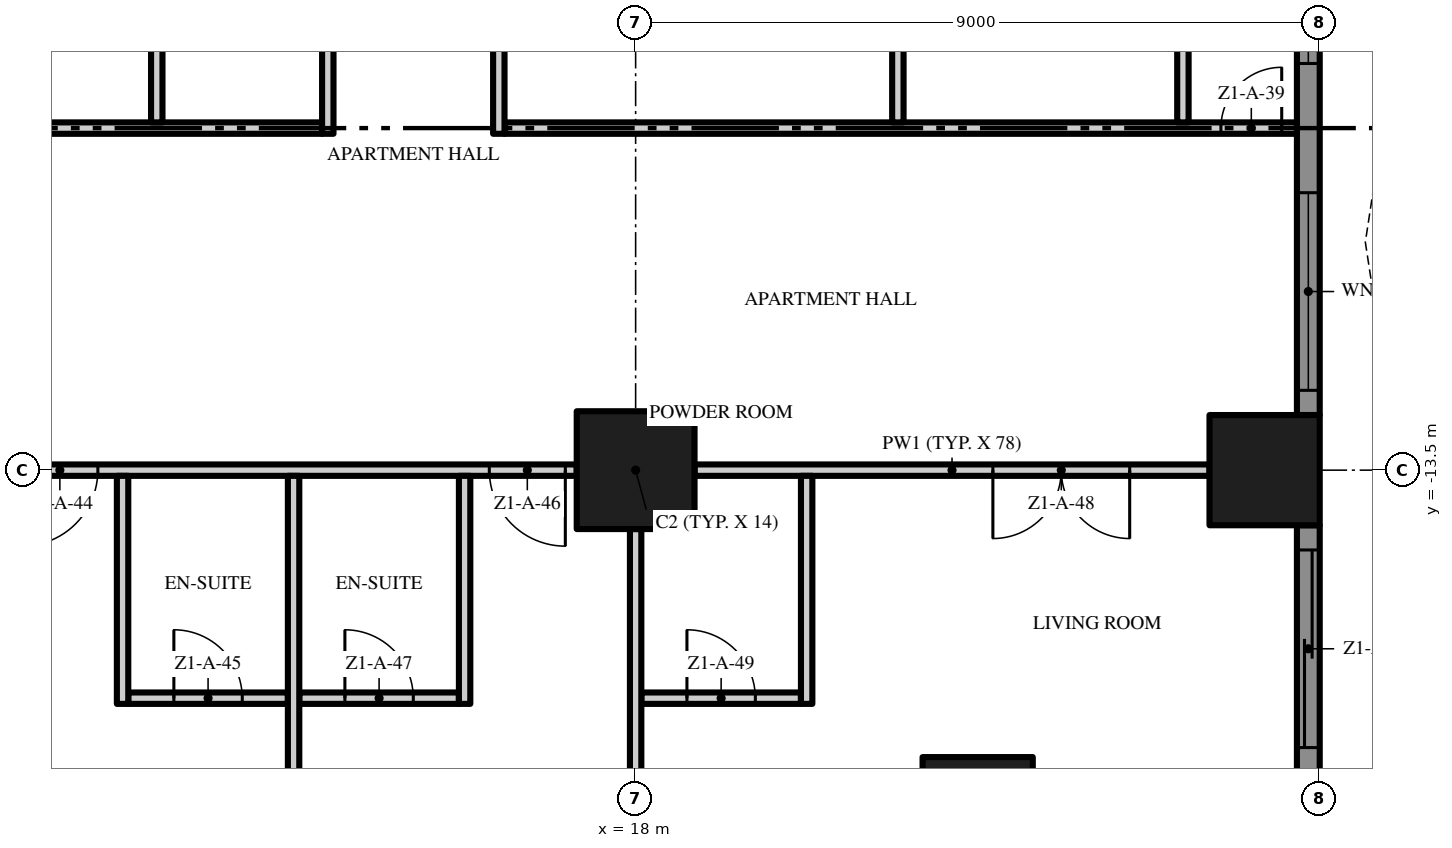
"""IFC4 building model, lengths in metres.
Left out: names, types, materials, properties, quantities, classifications, styles, units other than length and angle.
Written with IfcOpenShell. Run it as: python <this file> out.ifc"""

import sys

from ifc_helpers import new_model, si_unit, direction, frame, frame_2d, origin, origin_2d, place, context, subcontext, project, spatial, polyline, rectangle, outline, extrude, element, fill, save


model = new_model("IFC4")
c1 = context("Model", 3, precision=1e-05, world=origin(), true_north=direction((0.0, 1.0)))
c2 = subcontext(c1, "Body", "Model", "MODEL_VIEW")
j1 = project(units=[si_unit("LENGTHUNIT", "METRE"), si_unit("PLANEANGLEUNIT", "RADIAN")], contexts=[c1])
p1 = place(None, origin())
s1 = spatial("IfcSite", under=j1, at=p1, CompositionType="ELEMENT")
p2 = place(p1, origin())
s2 = spatial("IfcBuilding", under=s1, at=p2, CompositionType="ELEMENT")
p3 = place(p2, frame((0.0, 0.0, 22.6)))
s3 = spatial("IfcBuildingStorey", under=s2, at=p3, CompositionType="ELEMENT", Elevation=22.6)
p4 = place(p3, frame((18.0, -13.5, 0.0), z_axis=(0.0, 0.0, 1.0), x_axis=(1.0, 0.0, 0.0)))
e1 = element("IfcColumn", 1, at=p4, inside=s3, PredefinedType="COLUMN", context=c2, shape_type="SweptSolid", body=[
    extrude(rectangle(XDim=1.55, YDim=1.55, at=origin_2d()), origin(), (0.0, 0.0, 1.0), 3.5),
])
for number, where, z_axis, x_axis in (
    (2, (26.275, -13.5, 0.0), (0.0, 0.0, 1.0), (1.0, 0.0, 0.0)),
    (3, (22.5, -18.0, 0.0), (0.0, 0.0, 1.0), (1.0, 0.0, 0.0)),
):
    element("IfcColumn", number, at=place(p3, frame(where, z_axis=z_axis, x_axis=x_axis)), inside=s3, PredefinedType="COLUMN", context=c2, shape_type="SweptSolid", body=[
        extrude(rectangle(XDim=1.45, YDim=1.45, at=origin_2d()), origin(), (0.0, 0.0, 1.0), 3.5),
    ])
p5 = place(p3, frame((26.85, -14.225, 0.0), z_axis=(0.0, 0.0, 1.0), x_axis=(0.0, -1.0, 0.0)))
e4 = element("IfcWall", 4, at=p5, inside=s3, PredefinedType="SOLIDWALL", context=c2, shape_type="SweptSolid", body=[
    extrude(rectangle(XDim=3.475, YDim=0.3, at=frame_2d((1.738, 0.0))), origin(), (0.0, 0.0, 1.0), 3.5),
])
p6 = place(p5, frame((0.325, 0.0, 0.0)))
e5 = element("IfcOpeningElement", 5, at=p6, cuts=e4, PredefinedType="OPENING", context=c2, shape_type="SweptSolid", body=[
    extrude(rectangle(XDim=2.6, YDim=2.4, at=frame_2d((1.3, 1.2))), frame((0.0, 0.16, 0.0), z_axis=(0.0, -1.0, 0.0), x_axis=(1.0, 0.0, 0.0)), (0.0, 0.0, 1.0), 0.32),
])
p7 = place(p3, frame((26.85, -5.225, 0.0), z_axis=(0.0, 0.0, 1.0), x_axis=(0.0, -1.0, 0.0)))
e6 = element("IfcWall", 6, at=p7, inside=s3, PredefinedType="SOLIDWALL", context=c2, shape_type="SweptSolid", body=[
    extrude(rectangle(XDim=7.55, YDim=0.3, at=frame_2d((3.775, 0.0))), origin(), (0.0, 0.0, 1.0), 3.5),
])
p8 = place(p7, frame((4.625, 0.0, 0.45)))
e7 = element("IfcOpeningElement", 7, at=p8, cuts=e6, PredefinedType="OPENING", context=c2, shape_type="SweptSolid", body=[
    extrude(rectangle(XDim=2.6, YDim=2.65, at=frame_2d((1.3, 1.325))), frame((0.0, 0.16, 0.0), z_axis=(0.0, -1.0, 0.0), x_axis=(1.0, 0.0, 0.0)), (0.0, 0.0, 1.0), 0.32),
])
p9 = place(p7, frame((0.325, 0.0, 0.45)))
e8 = element("IfcOpeningElement", 8, at=p9, cuts=e6, PredefinedType="OPENING", context=c2, shape_type="SweptSolid", body=[
    extrude(rectangle(XDim=2.6, YDim=2.65, at=frame_2d((1.3, 1.325))), frame((0.0, 0.16, 0.0), z_axis=(0.0, -1.0, 0.0), x_axis=(1.0, 0.0, 0.0)), (0.0, 0.0, 1.0), 0.32),
])
p10 = place(p3, origin())
e9 = element("IfcWall", 9, at=p10, inside=s3, PredefinedType="USERDEFINED", context=c2, shape_type="SweptSolid", body=[
    extrude(outline(polyline([(30.0, -18.0), (29.771, -16.5), (29.171, -15.0), (28.429, -13.5), (27.829, -12.0), (27.6, -10.5), (27.829, -9.0), (28.429, -7.5), (29.171, -6.0), (29.771, -4.5), (30.0, -3.0), (29.771, -1.5), (29.171, 0.0), (28.429, 1.5), (27.829, 3.0), (27.6, 4.5), (27.829, 6.0), (28.429, 7.5), (29.171, 9.0), (29.771, 10.5), (30.0, 12.0), (29.771, 13.5), (29.171, 15.0), (28.429, 16.5), (27.829, 18.0), (27.597, 17.907), (28.201, 16.398), (28.942, 14.898), (29.528, 13.434), (29.747, 12.0), (29.528, 10.566), (28.942, 9.102), (28.201, 7.602), (27.586, 6.066), (27.347, 4.5), (27.586, 2.934), (28.201, 1.398), (28.942, -0.102), (29.528, -1.566), (29.747, -3.0), (29.528, -4.434), (28.942, -5.898), (28.201, -7.398), (27.586, -8.934), (27.347, -10.5), (27.586, -12.066), (28.201, -13.602), (28.942, -15.102), (29.528, -16.566), (29.753, -18.038), (30.0, -18.0)])), origin(), (0.0, 0.0, 1.0), 0.9),
])
p11 = place(p3, frame((11.325, -16.5, 0.0), z_axis=(0.0, 0.0, 1.0), x_axis=(1.0, 0.0, 0.0)))
e10 = element("IfcWall", 10, at=p11, inside=s3, PredefinedType="PARTITIONING", context=c2, shape_type="SweptSolid", body=[
    extrude(rectangle(XDim=2.1, YDim=0.15, at=frame_2d((1.05, 0.0))), origin(), (0.0, 0.0, 1.0), 3.5),
])
p12 = place(p11, frame((0.6, 0.0, 0.0)))
e11 = element("IfcOpeningElement", 11, at=p12, cuts=e10, PredefinedType="OPENING", context=c2, shape_type="SweptSolid", body=[
    extrude(rectangle(XDim=0.9, YDim=2.1, at=frame_2d((0.45, 1.05))), frame((0.0, 0.085, 0.0), z_axis=(0.0, -1.0, 0.0), x_axis=(1.0, 0.0, 0.0)), (0.0, 0.0, 1.0), 0.17),
])
p13 = place(p3, frame((13.575, -16.5, 0.0), z_axis=(0.0, 0.0, 1.0), x_axis=(1.0, 0.0, 0.0)))
e12 = element("IfcWall", 12, at=p13, inside=s3, PredefinedType="PARTITIONING", context=c2, shape_type="SweptSolid", body=[
    extrude(rectangle(XDim=2.1, YDim=0.15, at=frame_2d((1.05, 0.0))), origin(), (0.0, 0.0, 1.0), 3.5),
])
p14 = place(p13, frame((0.6, 0.0, 0.0)))
e13 = element("IfcOpeningElement", 13, at=p14, cuts=e12, PredefinedType="OPENING", context=c2, shape_type="SweptSolid", body=[
    extrude(rectangle(XDim=0.9, YDim=2.1, at=frame_2d((0.45, 1.05))), frame((0.0, 0.085, 0.0), z_axis=(0.0, -1.0, 0.0), x_axis=(1.0, 0.0, 0.0)), (0.0, 0.0, 1.0), 0.17),
])
p15 = place(p3, frame((18.075, -16.5, 0.0), z_axis=(0.0, 0.0, 1.0), x_axis=(1.0, 0.0, 0.0)))
e14 = element("IfcWall", 14, at=p15, inside=s3, PredefinedType="PARTITIONING", context=c2, shape_type="SweptSolid", body=[
    extrude(rectangle(XDim=2.1, YDim=0.15, at=frame_2d((1.05, 0.0))), origin(), (0.0, 0.0, 1.0), 3.5),
])
p16 = place(p15, frame((0.6, 0.0, 0.0)))
e15 = element("IfcOpeningElement", 15, at=p16, cuts=e14, PredefinedType="OPENING", context=c2, shape_type="SweptSolid", body=[
    extrude(rectangle(XDim=0.9, YDim=2.1, at=frame_2d((0.45, 1.05))), frame((0.0, 0.085, 0.0), z_axis=(0.0, -1.0, 0.0), x_axis=(1.0, 0.0, 0.0)), (0.0, 0.0, 1.0), 0.17),
])
p17 = place(p3, frame((17.225, -13.5, 0.0), z_axis=(0.0, 0.0, 1.0), x_axis=(-1.0, 0.0, 0.0)))
e16 = element("IfcWall", 16, at=p17, inside=s3, PredefinedType="PARTITIONING", context=c2, shape_type="SweptSolid", body=[
    extrude(rectangle(XDim=7.45, YDim=0.15, at=frame_2d((3.725, 0.0))), origin(), (0.0, 0.0, 1.0), 3.5),
])
p18 = place(p17, frame((6.3, 0.0, 0.0)))
e17 = element("IfcOpeningElement", 17, at=p18, cuts=e16, PredefinedType="OPENING", context=c2, shape_type="SweptSolid", body=[
    extrude(rectangle(XDim=1.0, YDim=2.4, at=frame_2d((0.5, 1.2))), frame((0.0, 0.085, 0.0), z_axis=(0.0, -1.0, 0.0), x_axis=(1.0, 0.0, 0.0)), (0.0, 0.0, 1.0), 0.17),
])
p19 = place(p17, frame((0.15, 0.0, 0.0)))
e18 = element("IfcOpeningElement", 18, at=p19, cuts=e16, PredefinedType="OPENING", context=c2, shape_type="SweptSolid", body=[
    extrude(rectangle(XDim=1.0, YDim=2.4, at=frame_2d((0.5, 1.2))), frame((0.0, 0.085, 0.0), z_axis=(0.0, -1.0, 0.0), x_axis=(1.0, 0.0, 0.0)), (0.0, 0.0, 1.0), 0.17),
])
p20 = place(p3, frame((25.55, -13.5, 0.0), z_axis=(0.0, 0.0, 1.0), x_axis=(-1.0, 0.0, 0.0)))
e19 = element("IfcWall", 19, at=p20, inside=s3, PredefinedType="PARTITIONING", context=c2, shape_type="SweptSolid", body=[
    extrude(rectangle(XDim=6.775, YDim=0.15, at=frame_2d((3.388, 0.0))), origin(), (0.0, 0.0, 1.0), 3.5),
])
p21 = place(p20, frame((1.05, 0.0, 0.0)))
e20 = element("IfcOpeningElement", 20, at=p21, cuts=e19, PredefinedType="OPENING", context=c2, shape_type="SweptSolid", body=[
    extrude(rectangle(XDim=1.8, YDim=2.4, at=frame_2d((0.9, 1.2))), frame((0.0, 0.085, 0.0), z_axis=(0.0, -1.0, 0.0), x_axis=(1.0, 0.0, 0.0)), (0.0, 0.0, 1.0), 0.17),
])
p22 = place(p3, frame((0.1, -9.0, 0.0), z_axis=(0.0, 0.0, 1.0), x_axis=(1.0, 0.0, 0.0)))
e21 = element("IfcWall", 21, at=p22, inside=s3, PredefinedType="PARTITIONING", context=c2, shape_type="SweptSolid", body=[
    extrude(rectangle(XDim=13.775, YDim=0.15, at=frame_2d((6.888, 0.0))), origin(), (0.0, 0.0, 1.0), 3.5),
])
p23 = place(p22, frame((8.1, 0.0, 0.0)))
e22 = element("IfcOpeningElement", 22, at=p23, cuts=e21, PredefinedType="OPENING", context=c2, shape_type="SweptSolid", body=[
    extrude(rectangle(XDim=1.0, YDim=2.4, at=frame_2d((0.5, 1.2))), frame((0.0, 0.085, 0.0), z_axis=(0.0, -1.0, 0.0), x_axis=(1.0, 0.0, 0.0)), (0.0, 0.0, 1.0), 0.17),
])
p24 = place(p3, frame((16.275, -9.0, 0.0), z_axis=(0.0, 0.0, 1.0), x_axis=(1.0, 0.0, 0.0)))
e23 = element("IfcWall", 23, at=p24, inside=s3, PredefinedType="PARTITIONING", context=c2, shape_type="SweptSolid", body=[
    extrude(rectangle(XDim=10.425, YDim=0.15, at=frame_2d((5.213, 0.0))), origin(), (0.0, 0.0, 1.0), 3.5),
])
p25 = place(p24, frame((9.425, 0.0, 0.0)))
e24 = element("IfcOpeningElement", 24, at=p25, cuts=e23, PredefinedType="OPENING", context=c2, shape_type="SweptSolid", body=[
    extrude(rectangle(XDim=0.8, YDim=2.0, at=frame_2d((0.4, 1.0))), frame((0.0, 0.085, 0.0), z_axis=(0.0, -1.0, 0.0), x_axis=(1.0, 0.0, 0.0)), (0.0, 0.0, 1.0), 0.17),
])
p26 = place(p3, frame((11.25, -16.575, 0.0), z_axis=(0.0, 0.0, 1.0), x_axis=(0.0, 1.0, 0.0)))
e25 = element("IfcWall", 25, at=p26, inside=s3, PredefinedType="PARTITIONING", context=c2, shape_type="SweptSolid", body=[
    extrude(rectangle(XDim=3.0, YDim=0.15, at=frame_2d((1.5, 0.0))), origin(), (0.0, 0.0, 1.0), 3.5),
])
p27 = place(p3, frame((11.7, -8.925, 0.0), z_axis=(0.0, 0.0, 1.0), x_axis=(0.0, 1.0, 0.0)))
e26 = element("IfcWall", 26, at=p27, inside=s3, PredefinedType="PARTITIONING", context=c2, shape_type="SweptSolid", body=[
    extrude(rectangle(XDim=4.35, YDim=0.15, at=frame_2d((2.175, 0.0))), origin(), (0.0, 0.0, 1.0), 3.5),
])
p28 = place(p3, frame((13.5, -22.2, 0.0), z_axis=(0.0, 0.0, 1.0), x_axis=(0.0, 1.0, 0.0)))
e27 = element("IfcWall", 27, at=p28, inside=s3, PredefinedType="PARTITIONING", context=c2, shape_type="SweptSolid", body=[
    extrude(rectangle(XDim=8.625, YDim=0.15, at=frame_2d((4.312, 0.0))), origin(), (0.0, 0.0, 1.0), 3.5),
])
p29 = place(p3, frame((13.95, -9.075, 0.0), z_axis=(0.0, 0.0, 1.0), x_axis=(0.0, 1.0, 0.0)))
e28 = element("IfcWall", 28, at=p29, inside=s3, PredefinedType="PARTITIONING", context=c2, shape_type="SweptSolid", body=[
    extrude(rectangle(XDim=4.65, YDim=0.15, at=frame_2d((2.325, 0.0))), origin(), (0.0, 0.0, 1.0), 3.5),
])
p30 = place(p29, frame((1.875, 0.0, 0.0)))
e29 = element("IfcOpeningElement", 29, at=p30, cuts=e28, PredefinedType="OPENING", context=c2, shape_type="SweptSolid", body=[
    extrude(rectangle(XDim=0.9, YDim=2.1, at=frame_2d((0.45, 1.05))), frame((0.0, 0.085, 0.0), z_axis=(0.0, -1.0, 0.0), x_axis=(1.0, 0.0, 0.0)), (0.0, 0.0, 1.0), 0.17),
])
p31 = place(p3, frame((15.75, -16.575, 0.0), z_axis=(0.0, 0.0, 1.0), x_axis=(0.0, 1.0, 0.0)))
e30 = element("IfcWall", 30, at=p31, inside=s3, PredefinedType="PARTITIONING", context=c2, shape_type="SweptSolid", body=[
    extrude(rectangle(XDim=3.0, YDim=0.15, at=frame_2d((1.5, 0.0))), origin(), (0.0, 0.0, 1.0), 3.5),
])
p32 = place(p3, frame((16.2, -9.075, 0.0), z_axis=(0.0, 0.0, 1.0), x_axis=(0.0, 1.0, 0.0)))
e31 = element("IfcWall", 31, at=p32, inside=s3, PredefinedType="PARTITIONING", context=c2, shape_type="SweptSolid", body=[
    extrude(rectangle(XDim=4.65, YDim=0.15, at=frame_2d((2.325, 0.0))), origin(), (0.0, 0.0, 1.0), 3.5),
])
p33 = place(p3, frame((18.0, -21.05, 0.0), z_axis=(0.0, 0.0, 1.0), x_axis=(0.0, 1.0, 0.0)))
e32 = element("IfcWall", 32, at=p33, inside=s3, PredefinedType="PARTITIONING", context=c2, shape_type="SweptSolid", body=[
    extrude(rectangle(XDim=6.775, YDim=0.15, at=frame_2d((3.388, 0.0))), origin(), (0.0, 0.0, 1.0), 3.5),
])
p34 = place(p3, frame((20.25, -16.575, 0.0), z_axis=(0.0, 0.0, 1.0), x_axis=(0.0, 1.0, 0.0)))
e33 = element("IfcWall", 33, at=p34, inside=s3, PredefinedType="PARTITIONING", context=c2, shape_type="SweptSolid", body=[
    extrude(rectangle(XDim=3.0, YDim=0.15, at=frame_2d((1.5, 0.0))), origin(), (0.0, 0.0, 1.0), 3.5),
])
p35 = place(p3, frame((21.45, -4.575, 0.0), z_axis=(0.0, 0.0, 1.0), x_axis=(0.0, -1.0, 0.0)))
e34 = element("IfcWall", 34, at=p35, inside=s3, PredefinedType="PARTITIONING", context=c2, shape_type="SweptSolid", body=[
    extrude(rectangle(XDim=4.35, YDim=0.15, at=frame_2d((2.175, 0.0))), origin(), (0.0, 0.0, 1.0), 3.5),
])
p36 = place(p35, frame((1.7, 0.0, 0.0)))
e35 = element("IfcOpeningElement", 35, at=p36, cuts=e34, PredefinedType="OPENING", context=c2, shape_type="SweptSolid", body=[
    extrude(rectangle(XDim=0.9, YDim=2.1, at=frame_2d((0.45, 1.05))), frame((0.0, 0.085, 0.0), z_axis=(0.0, -1.0, 0.0), x_axis=(1.0, 0.0, 0.0)), (0.0, 0.0, 1.0), 0.17),
])
p37 = place(p3, frame((25.2, -8.925, 0.0), z_axis=(0.0, 0.0, 1.0), x_axis=(0.0, 1.0, 0.0)))
e36 = element("IfcWall", 36, at=p37, inside=s3, PredefinedType="PARTITIONING", context=c2, shape_type="SweptSolid", body=[
    extrude(rectangle(XDim=4.35, YDim=0.15, at=frame_2d((2.175, 0.0))), origin(), (0.0, 0.0, 1.0), 3.5),
])
p38 = place(p6, origin())
e37 = element("IfcDoor", 37, at=p38, inside=s3, OperationType="SINGLE_SWING_LEFT", PredefinedType="DOOR", context=c2, shape_type="SweptSolid", body=[
    extrude(rectangle(XDim=2.6, YDim=2.4, at=frame_2d((1.3, 1.2))), frame((0.0, 0.025, 0.0), z_axis=(0.0, -1.0, 0.0), x_axis=(1.0, 0.0, 0.0)), (0.0, 0.0, 1.0), 0.05),
])
fill(e5, e37)
p39 = place(p8, origin())
e38 = element("IfcWindow", 38, at=p39, inside=s3, PartitioningType="SINGLE_PANEL", PredefinedType="WINDOW", context=c2, shape_type="SweptSolid", body=[
    extrude(rectangle(XDim=2.6, YDim=2.65, at=frame_2d((1.3, 1.325))), frame((0.0, 0.03, 0.0), z_axis=(0.0, -1.0, 0.0), x_axis=(1.0, 0.0, 0.0)), (0.0, 0.0, 1.0), 0.06),
])
fill(e7, e38)
p40 = place(p9, origin())
e39 = element("IfcWindow", 39, at=p40, inside=s3, PartitioningType="SINGLE_PANEL", PredefinedType="WINDOW", context=c2, shape_type="SweptSolid", body=[
    extrude(rectangle(XDim=2.6, YDim=2.65, at=frame_2d((1.3, 1.325))), frame((0.0, 0.03, 0.0), z_axis=(0.0, -1.0, 0.0), x_axis=(1.0, 0.0, 0.0)), (0.0, 0.0, 1.0), 0.06),
])
fill(e8, e39)
p41 = place(p25, origin())
e40 = element("IfcDoor", 40, at=p41, inside=s3, OperationType="SINGLE_SWING_RIGHT", PredefinedType="DOOR", context=c2, shape_type="SweptSolid", body=[
    extrude(rectangle(XDim=0.8, YDim=2.0, at=frame_2d((0.4, 1.0))), frame((0.0, 0.025, 0.0), z_axis=(0.0, -1.0, 0.0), x_axis=(1.0, 0.0, 0.0)), (0.0, 0.0, 1.0), 0.05),
])
fill(e24, e40)
p42 = place(p18, origin())
e41 = element("IfcDoor", 41, at=p42, inside=s3, OperationType="SINGLE_SWING_RIGHT", PredefinedType="DOOR", context=c2, shape_type="SweptSolid", body=[
    extrude(rectangle(XDim=1.0, YDim=2.4, at=frame_2d((0.5, 1.2))), frame((0.0, 0.025, 0.0), z_axis=(0.0, -1.0, 0.0), x_axis=(1.0, 0.0, 0.0)), (0.0, 0.0, 1.0), 0.05),
])
fill(e17, e41)
p43 = place(p12, origin())
e42 = element("IfcDoor", 42, at=p43, inside=s3, OperationType="SINGLE_SWING_LEFT", PredefinedType="DOOR", context=c2, shape_type="SweptSolid", body=[
    extrude(rectangle(XDim=0.9, YDim=2.1, at=frame_2d((0.45, 1.05))), frame((0.0, 0.025, 0.0), z_axis=(0.0, -1.0, 0.0), x_axis=(1.0, 0.0, 0.0)), (0.0, 0.0, 1.0), 0.05),
])
fill(e11, e42)
p44 = place(p19, origin())
e43 = element("IfcDoor", 43, at=p44, inside=s3, OperationType="SINGLE_SWING_LEFT", PredefinedType="DOOR", context=c2, shape_type="SweptSolid", body=[
    extrude(rectangle(XDim=1.0, YDim=2.4, at=frame_2d((0.5, 1.2))), frame((0.0, 0.025, 0.0), z_axis=(0.0, -1.0, 0.0), x_axis=(1.0, 0.0, 0.0)), (0.0, 0.0, 1.0), 0.05),
])
fill(e18, e43)
p45 = place(p14, origin())
e44 = element("IfcDoor", 44, at=p45, inside=s3, OperationType="SINGLE_SWING_LEFT", PredefinedType="DOOR", context=c2, shape_type="SweptSolid", body=[
    extrude(rectangle(XDim=0.9, YDim=2.1, at=frame_2d((0.45, 1.05))), frame((0.0, 0.025, 0.0), z_axis=(0.0, -1.0, 0.0), x_axis=(1.0, 0.0, 0.0)), (0.0, 0.0, 1.0), 0.05),
])
fill(e13, e44)
p46 = place(p21, origin())
e45 = element("IfcDoor", 45, at=p46, inside=s3, OperationType="DOUBLE_DOOR_SINGLE_SWING", PredefinedType="DOOR", context=c2, shape_type="SweptSolid", body=[
    extrude(rectangle(XDim=1.8, YDim=2.4, at=frame_2d((0.9, 1.2))), frame((0.0, 0.025, 0.0), z_axis=(0.0, -1.0, 0.0), x_axis=(1.0, 0.0, 0.0)), (0.0, 0.0, 1.0), 0.05),
])
fill(e20, e45)
p47 = place(p16, origin())
e46 = element("IfcDoor", 46, at=p47, inside=s3, OperationType="SINGLE_SWING_LEFT", PredefinedType="DOOR", context=c2, shape_type="SweptSolid", body=[
    extrude(rectangle(XDim=0.9, YDim=2.1, at=frame_2d((0.45, 1.05))), frame((0.0, 0.025, 0.0), z_axis=(0.0, -1.0, 0.0), x_axis=(1.0, 0.0, 0.0)), (0.0, 0.0, 1.0), 0.05),
])
fill(e15, e46)
save(model, sys.argv[1])
